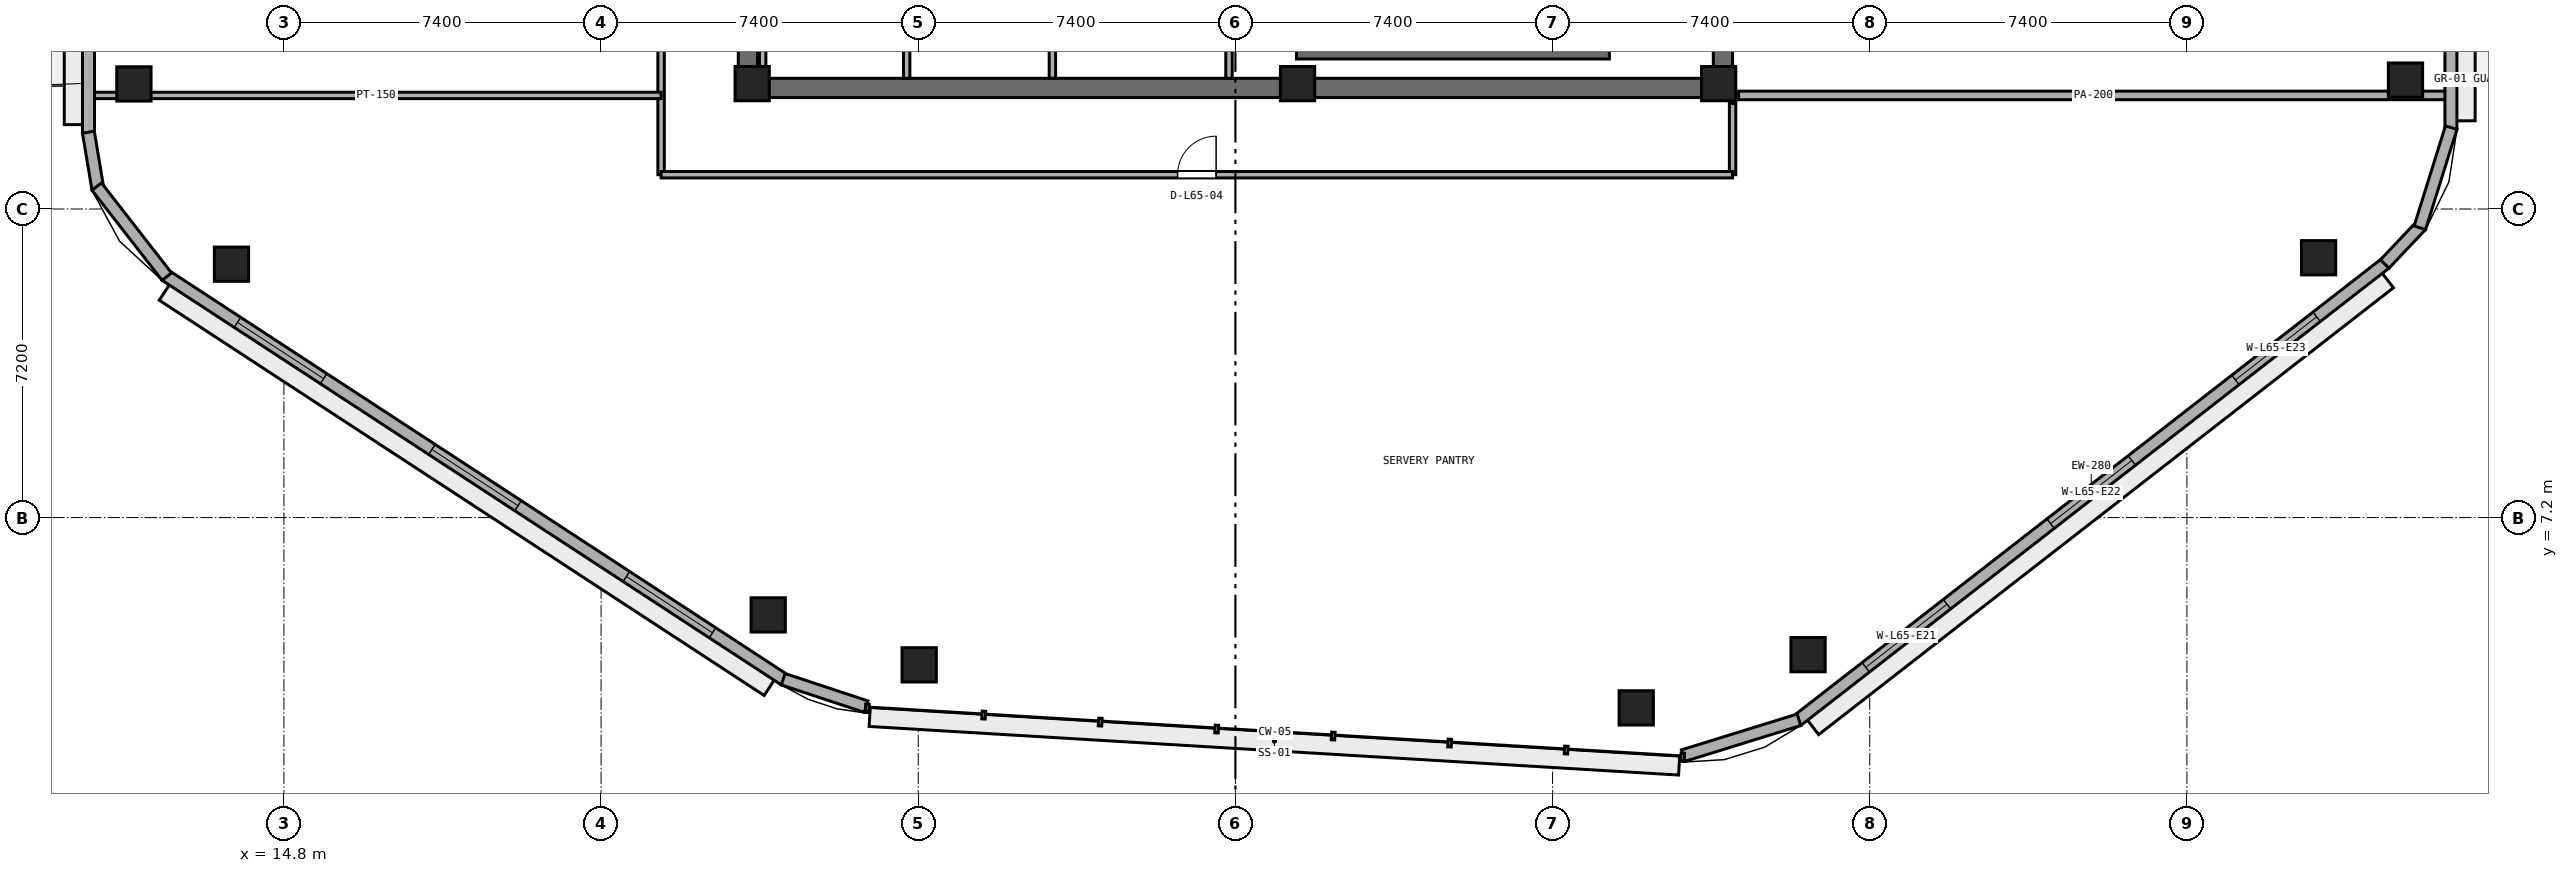
"""IFC4 building model, lengths in metres.
Left out: names, types, materials, properties, quantities, classifications, styles, units other than length and angle.
Written with IfcOpenShell. Run it as: python <this file> out.ifc"""

import sys

from ifc_helpers import new_model, si_unit, direction, frame, frame_2d, origin, origin_2d, place, context, subcontext, project, spatial, rectangle, extrude, element, fill, save


model = new_model("IFC4")
c1 = context("Model", 3, precision=1e-05, world=origin(), true_north=direction((0.0, 1.0)))
c2 = subcontext(c1, "Body", "Model", "MODEL_VIEW")
j1 = project(units=[si_unit("LENGTHUNIT", "METRE"), si_unit("PLANEANGLEUNIT", "RADIAN")], contexts=[c1])
p1 = place(None, origin())
s1 = spatial("IfcSite", under=j1, at=p1, CompositionType="ELEMENT")
p2 = place(p1, origin())
s2 = spatial("IfcBuilding", under=s1, at=p2, CompositionType="ELEMENT")
p3 = place(p2, frame((0.0, 0.0, 255.4)))
s3 = spatial("IfcBuildingStorey", under=s2, at=p3, CompositionType="ELEMENT", Elevation=255.4)
p4 = place(p3, frame((25.4, 17.225, 0.0), z_axis=(0.0, 0.0, 1.0), x_axis=(1.0, 0.0, 0.0)))
e1 = element("IfcWall", 1, at=p4, inside=s3, PredefinedType="SHEAR", context=c2, shape_type="SweptSolid", body=[
    extrude(rectangle(XDim=23.2, YDim=0.45, at=frame_2d((11.6, 0.0))), origin(), (0.0, 0.0, 1.0), 3.51),
])
p5 = place(p3, frame((25.625, 17.45, 0.0), z_axis=(0.0, 0.0, 1.0), x_axis=(0.0, 1.0, 0.0)))
e2 = element("IfcWall", 2, at=p5, inside=s3, PredefinedType="SHEAR", context=c2, shape_type="SweptSolid", body=[
    extrude(rectangle(XDim=15.5, YDim=0.45, at=frame_2d((7.75, 0.0))), origin(), (0.0, 0.0, 1.0), 3.51),
])
p6 = place(p5, frame((7.0, 0.0, 0.0)))
e3 = element("IfcOpeningElement", 3, at=p6, cuts=e2, PredefinedType="OPENING", context=c2, shape_type="SweptSolid", body=[
    extrude(rectangle(XDim=1.5, YDim=2.15, at=frame_2d((0.75, 1.075))), frame((0.0, 0.235, 0.0), z_axis=(0.0, -1.0, 0.0), x_axis=(1.0, 0.0, 0.0)), (0.0, 0.0, 1.0), 0.47),
])
p7 = place(p3, frame((48.375, 17.45, 0.0), z_axis=(0.0, 0.0, 1.0), x_axis=(0.0, 1.0, 0.0)))
e4 = element("IfcWall", 4, at=p7, inside=s3, PredefinedType="SHEAR", context=c2, shape_type="SweptSolid", body=[
    extrude(rectangle(XDim=15.5, YDim=0.45, at=frame_2d((7.75, 0.0))), origin(), (0.0, 0.0, 1.0), 3.51),
])
p8 = place(p7, frame((5.85, 0.0, 0.0)))
e5 = element("IfcOpeningElement", 5, at=p8, cuts=e4, PredefinedType="OPENING", context=c2, shape_type="SweptSolid", body=[
    extrude(rectangle(XDim=1.5, YDim=2.15, at=frame_2d((0.75, 1.075))), frame((0.0, 0.235, 0.0), z_axis=(0.0, -1.0, 0.0), x_axis=(1.0, 0.0, 0.0)), (0.0, 0.0, 1.0), 0.47),
])
for number, where, z_axis, x_axis in (
    (6, (25.725, 17.325, 0.0), (0.0, 0.0, 1.0), (1.0, 0.0, 0.0)),
    (7, (38.45, 17.325, 0.0), (0.0, 0.0, 1.0), (1.0, 0.0, 0.0)),
    (8, (48.275, 17.325, 0.0), (0.0, 0.0, 1.0), (1.0, 0.0, 0.0)),
):
    element("IfcColumn", number, at=place(p3, frame(where, z_axis=z_axis, x_axis=x_axis)), inside=s3, PredefinedType="PILASTER", context=c2, shape_type="SweptSolid", body=[
        extrude(rectangle(XDim=0.8, YDim=0.8, at=origin_2d()), origin(), (0.0, 0.0, 1.0), 3.8),
    ])
for number, where, z_axis, x_axis in (
    (9, (29.622, 3.764, 0.0), (0.0, 0.0, 1.0), (1.0, 0.0, 0.0)),
    (10, (46.352, 2.76, 0.0), (0.0, 0.0, 1.0), (1.0, 0.0, 0.0)),
    (11, (50.361, 4.002, 0.0), (0.0, 0.0, 1.0), (1.0, 0.0, 0.0)),
    (12, (62.272, 13.262, 0.0), (0.0, 0.0, 1.0), (1.0, 0.0, 0.0)),
    (13, (64.3, 17.408, 0.0), (0.0, 0.0, 1.0), (1.0, 0.0, 0.0)),
    (14, (11.3, 17.319, 0.0), (0.0, 0.0, 1.0), (1.0, 0.0, 0.0)),
    (15, (13.576, 13.112, 0.0), (0.0, 0.0, 1.0), (1.0, 0.0, 0.0)),
    (16, (26.099, 4.929, 0.0), (0.0, 0.0, 1.0), (1.0, 0.0, 0.0)),
):
    element("IfcColumn", number, at=place(p3, frame(where, z_axis=z_axis, x_axis=x_axis)), inside=s3, PredefinedType="COLUMN", context=c2, shape_type="SweptSolid", body=[
        extrude(rectangle(XDim=0.8, YDim=0.8, at=origin_2d()), origin(), (0.0, 0.0, 1.0), 3.8),
    ])
p9 = place(p3, frame((38.425, 18.025, 0.0), z_axis=(0.0, 0.0, 1.0), x_axis=(1.0, 0.0, 0.0)))
e17 = element("IfcWall", 17, at=p9, inside=s3, PredefinedType="SHEAR", context=c2, shape_type="SweptSolid", body=[
    extrude(rectangle(XDim=7.3, YDim=0.25, at=frame_2d((3.65, 0.0))), origin(), (0.0, 0.0, 1.0), 3.51),
])
p10 = place(p3, frame((25.97, 17.45, 0.0), z_axis=(0.0, 0.0, 1.0), x_axis=(0.0, 1.0, 0.0)))
e18 = element("IfcWall", 18, at=p10, inside=s3, PredefinedType="PARTITIONING", context=c2, shape_type="SweptSolid", body=[
    extrude(rectangle(XDim=2.3, YDim=0.15, at=frame_2d((1.15, 0.0))), origin(), (0.0, 0.0, 1.0), 2.61),
])
for number, where, z_axis, x_axis in (
    (19, (29.33, 17.45, 0.0), (0.0, 0.0, 1.0), (0.0, 1.0, 0.0)),
    (20, (32.73, 17.45, 0.0), (0.0, 0.0, 1.0), (0.0, 1.0, 0.0)),
    (21, (36.85, 17.45, 0.0), (0.0, 0.0, 1.0), (0.0, 1.0, 0.0)),
):
    element("IfcWall", number, at=place(p3, frame(where, z_axis=z_axis, x_axis=x_axis)), inside=s3, PredefinedType="PARTITIONING", context=c2, shape_type="SweptSolid", body=[
        extrude(rectangle(XDim=2.3, YDim=0.15, at=frame_2d((1.15, 0.0))), origin(), (0.0, 0.0, 1.0), 3.51),
    ])
p11 = place(p3, frame((48.6, 15.2, 0.0), z_axis=(0.0, 0.0, 1.0), x_axis=(0.0, 1.0, 0.0)))
e22 = element("IfcWall", 22, at=p11, inside=s3, PredefinedType="PARTITIONING", context=c2, shape_type="SweptSolid", body=[
    extrude(rectangle(XDim=1.66, YDim=0.15, at=frame_2d((0.83, 0.0))), origin(), (0.0, 0.0, 1.0), 2.893),
])
p12 = place(p3, frame((23.6, 15.2, 0.0), z_axis=(0.0, 0.0, 1.0), x_axis=(0.0, 1.0, 0.0)))
e23 = element("IfcWall", 23, at=p12, inside=s3, PredefinedType="PARTITIONING", context=c2, shape_type="SweptSolid", body=[
    extrude(rectangle(XDim=20.0, YDim=0.15, at=frame_2d((10.0, 0.0))), origin(), (0.0, 0.0, 1.0), 3.51),
])
p13 = place(p12, frame((9.55, 0.0, 0.0)))
e24 = element("IfcOpeningElement", 24, at=p13, cuts=e23, PredefinedType="OPENING", context=c2, shape_type="SweptSolid", body=[
    extrude(rectangle(XDim=0.9, YDim=2.1, at=frame_2d((0.45, 1.05))), frame((0.0, 0.085, 0.0), z_axis=(0.0, -1.0, 0.0), x_axis=(1.0, 0.0, 0.0)), (0.0, 0.0, 1.0), 0.17),
])
p14 = place(p3, frame((23.6, 15.2, 0.0), z_axis=(0.0, 0.0, 1.0), x_axis=(1.0, 0.0, 0.0)))
e25 = element("IfcWall", 25, at=p14, inside=s3, PredefinedType="PARTITIONING", context=c2, shape_type="SweptSolid", body=[
    extrude(rectangle(XDim=25.0, YDim=0.15, at=frame_2d((12.5, 0.0))), origin(), (0.0, 0.0, 1.0), 3.51),
])
p15 = place(p14, frame((12.05, 0.0, 0.0)))
e26 = element("IfcOpeningElement", 26, at=p15, cuts=e25, PredefinedType="OPENING", context=c2, shape_type="SweptSolid", body=[
    extrude(rectangle(XDim=0.9, YDim=2.1, at=frame_2d((0.45, 1.05))), frame((0.0, 0.085, 0.0), z_axis=(0.0, -1.0, 0.0), x_axis=(1.0, 0.0, 0.0)), (0.0, 0.0, 1.0), 0.17),
])
p16 = place(p3, frame((10.305, 17.05, 0.0), z_axis=(0.0, 0.0, 1.0), x_axis=(1.0, 0.0, 0.0)))
e27 = element("IfcWall", 27, at=p16, inside=s3, PredefinedType="PARTITIONING", context=c2, shape_type="SweptSolid", body=[
    extrude(rectangle(XDim=13.295, YDim=0.15, at=frame_2d((6.647, 0.0))), origin(), (0.0, 0.0, 1.0), 3.51),
])
p17 = place(p3, frame((48.74, 17.05, 0.0), z_axis=(0.0, 0.0, 1.0), x_axis=(1.0, 0.0, 0.0)))
e28 = element("IfcWall", 28, at=p17, inside=s3, PredefinedType="PARTITIONING", context=c2, shape_type="SweptSolid", body=[
    extrude(rectangle(XDim=16.555, YDim=0.2, at=frame_2d((8.277, 0.0))), origin(), (0.0, 0.0, 1.0), 2.893),
])
p18 = place(p3, frame((50.104, 2.459, 0.0), z_axis=(0.0, 0.0, 1.0), x_axis=(0.789464857485, 0.613795763097, 0.0)))
e29 = element("IfcWall", 29, at=p18, inside=s3, PredefinedType="STANDARD", context=c2, shape_type="SweptSolid", body=[
    extrude(rectangle(XDim=17.387, YDim=0.28, at=frame_2d((8.694, 0.0))), origin(), (0.0, 0.0, 1.0), 3.51),
])
p19 = place(p18, frame((2.031, 0.0, 0.9)))
e30 = element("IfcOpeningElement", 30, at=p19, cuts=e29, PredefinedType="OPENING", context=c2, shape_type="SweptSolid", body=[
    extrude(rectangle(XDim=2.4, YDim=1.75, at=frame_2d((1.2, 0.875))), frame((0.0, 0.15, 0.0), z_axis=(0.0, -1.0, 0.0), x_axis=(1.0, 0.0, 0.0)), (0.0, 0.0, 1.0), 0.3),
])
p20 = place(p18, frame((7.494, 0.0, 0.9)))
e31 = element("IfcOpeningElement", 31, at=p20, cuts=e29, PredefinedType="OPENING", context=c2, shape_type="SweptSolid", body=[
    extrude(rectangle(XDim=2.4, YDim=1.75, at=frame_2d((1.2, 0.875))), frame((0.0, 0.15, 0.0), z_axis=(0.0, -1.0, 0.0), x_axis=(1.0, 0.0, 0.0)), (0.0, 0.0, 1.0), 0.3),
])
p21 = place(p18, frame((12.956, 0.0, 0.9)))
e32 = element("IfcOpeningElement", 32, at=p21, cuts=e29, PredefinedType="OPENING", context=c2, shape_type="SweptSolid", body=[
    extrude(rectangle(XDim=2.4, YDim=1.75, at=frame_2d((1.2, 0.875))), frame((0.0, 0.15, 0.0), z_axis=(0.0, -1.0, 0.0), x_axis=(1.0, 0.0, 0.0)), (0.0, 0.0, 1.0), 0.3),
])
p22 = place(p3, frame((65.36, 16.258, 0.0), z_axis=(0.0, 0.0, 1.0), x_axis=(0.0, 1.0, 0.0)))
e33 = element("IfcWall", 33, at=p22, inside=s3, PredefinedType="STANDARD", context=c2, shape_type="SweptSolid", body=[
    extrude(rectangle(XDim=19.168, YDim=0.28, at=frame_2d((9.584, 0.0))), origin(), (0.0, 0.0, 1.0), 3.51),
])
p23 = place(p22, frame((9.034, 0.0, 0.0)))
e34 = element("IfcOpeningElement", 34, at=p23, cuts=e33, PredefinedType="OPENING", context=c2, shape_type="SweptSolid", body=[
    extrude(rectangle(XDim=1.1, YDim=2.2, at=frame_2d((0.55, 1.1))), frame((0.0, 0.15, 0.0), z_axis=(0.0, -1.0, 0.0), x_axis=(1.0, 0.0, 0.0)), (0.0, 0.0, 1.0), 0.3),
])
p24 = place(p22, frame((2.328, 0.0, 0.9)))
e35 = element("IfcOpeningElement", 35, at=p24, cuts=e33, PredefinedType="OPENING", context=c2, shape_type="SweptSolid", body=[
    extrude(rectangle(XDim=2.4, YDim=1.75, at=frame_2d((1.2, 0.875))), frame((0.0, 0.15, 0.0), z_axis=(0.0, -1.0, 0.0), x_axis=(1.0, 0.0, 0.0)), (0.0, 0.0, 1.0), 0.3),
])
p25 = place(p22, frame((14.19, 0.0, 0.9)))
e36 = element("IfcOpeningElement", 36, at=p25, cuts=e33, PredefinedType="OPENING", context=c2, shape_type="SweptSolid", body=[
    extrude(rectangle(XDim=2.4, YDim=1.75, at=frame_2d((1.2, 0.875))), frame((0.0, 0.15, 0.0), z_axis=(0.0, -1.0, 0.0), x_axis=(1.0, 0.0, 0.0)), (0.0, 0.0, 1.0), 0.3),
])
p26 = place(p3, frame((10.24, 33.425, 0.0), z_axis=(0.0, 0.0, 1.0), x_axis=(0.0, -1.0, 0.0)))
e37 = element("IfcWall", 37, at=p26, inside=s3, PredefinedType="STANDARD", context=c2, shape_type="SweptSolid", body=[
    extrude(rectangle(XDim=17.257, YDim=0.28, at=frame_2d((8.628, 0.0))), origin(), (0.0, 0.0, 1.0), 3.51),
])
p27 = place(p26, frame((8.078, 0.0, 0.0)))
e38 = element("IfcOpeningElement", 38, at=p27, cuts=e37, PredefinedType="OPENING", context=c2, shape_type="SweptSolid", body=[
    extrude(rectangle(XDim=1.1, YDim=2.2, at=frame_2d((0.55, 1.1))), frame((0.0, 0.15, 0.0), z_axis=(0.0, -1.0, 0.0), x_axis=(1.0, 0.0, 0.0)), (0.0, 0.0, 1.0), 0.3),
])
p28 = place(p26, frame((2.01, 0.0, 0.9)))
e39 = element("IfcOpeningElement", 39, at=p28, cuts=e37, PredefinedType="OPENING", context=c2, shape_type="SweptSolid", body=[
    extrude(rectangle(XDim=2.4, YDim=1.75, at=frame_2d((1.2, 0.875))), frame((0.0, 0.15, 0.0), z_axis=(0.0, -1.0, 0.0), x_axis=(1.0, 0.0, 0.0)), (0.0, 0.0, 1.0), 0.3),
])
p29 = place(p26, frame((12.847, 0.0, 0.9)))
e40 = element("IfcOpeningElement", 40, at=p29, cuts=e37, PredefinedType="OPENING", context=c2, shape_type="SweptSolid", body=[
    extrude(rectangle(XDim=2.4, YDim=1.75, at=frame_2d((1.2, 0.875))), frame((0.0, 0.15, 0.0), z_axis=(0.0, -1.0, 0.0), x_axis=(1.0, 0.0, 0.0)), (0.0, 0.0, 1.0), 0.3),
])
p30 = place(p3, frame((12.034, 12.854, 0.0), z_axis=(0.0, 0.0, 1.0), x_axis=(0.837118352984, -0.547021812269, 0.0)))
e41 = element("IfcWall", 41, at=p30, inside=s3, PredefinedType="STANDARD", context=c2, shape_type="SweptSolid", body=[
    extrude(rectangle(XDim=17.259, YDim=0.28, at=frame_2d((8.63, 0.0))), origin(), (0.0, 0.0, 1.0), 3.51),
])
p31 = place(p30, frame((2.01, 0.0, 0.9)))
e42 = element("IfcOpeningElement", 42, at=p31, cuts=e41, PredefinedType="OPENING", context=c2, shape_type="SweptSolid", body=[
    extrude(rectangle(XDim=2.4, YDim=1.75, at=frame_2d((1.2, 0.875))), frame((0.0, 0.15, 0.0), z_axis=(0.0, -1.0, 0.0), x_axis=(1.0, 0.0, 0.0)), (0.0, 0.0, 1.0), 0.3),
])
p32 = place(p30, frame((7.43, 0.0, 0.9)))
e43 = element("IfcOpeningElement", 43, at=p32, cuts=e41, PredefinedType="OPENING", context=c2, shape_type="SweptSolid", body=[
    extrude(rectangle(XDim=2.4, YDim=1.75, at=frame_2d((1.2, 0.875))), frame((0.0, 0.15, 0.0), z_axis=(0.0, -1.0, 0.0), x_axis=(1.0, 0.0, 0.0)), (0.0, 0.0, 1.0), 0.3),
])
p33 = place(p30, frame((12.849, 0.0, 0.9)))
e44 = element("IfcOpeningElement", 44, at=p33, cuts=e41, PredefinedType="OPENING", context=c2, shape_type="SweptSolid", body=[
    extrude(rectangle(XDim=2.4, YDim=1.75, at=frame_2d((1.2, 0.875))), frame((0.0, 0.15, 0.0), z_axis=(0.0, -1.0, 0.0), x_axis=(1.0, 0.0, 0.0)), (0.0, 0.0, 1.0), 0.3),
])
p34 = place(p3, frame((47.448, 1.646, 0.0), z_axis=(0.0, 0.0, 1.0), x_axis=(0.955196399159, 0.295972699812, 0.0)))
e45 = element("IfcWall", 45, at=p34, inside=s3, PredefinedType="STANDARD", context=c2, shape_type="SweptSolid", body=[
    extrude(rectangle(XDim=2.827, YDim=0.28, at=frame_2d((1.414, 0.0))), origin(), (0.0, 0.0, 1.0), 3.51),
])
p35 = place(p3, frame((63.815, 13.117, 0.0), z_axis=(0.0, 0.0, 1.0), x_axis=(0.687733716128, 0.725963040176, 0.0)))
e46 = element("IfcWall", 46, at=p35, inside=s3, PredefinedType="STANDARD", context=c2, shape_type="SweptSolid", body=[
    extrude(rectangle(XDim=1.239, YDim=0.28, at=frame_2d((0.62, 0.0))), origin(), (0.0, 0.0, 1.0), 3.51),
])
p36 = place(p3, frame((64.635, 13.962, 0.0), z_axis=(0.0, 0.0, 1.0), x_axis=(0.298649578722, 0.954362839348, 0.0)))
e47 = element("IfcWall", 47, at=p36, inside=s3, PredefinedType="STANDARD", context=c2, shape_type="SweptSolid", body=[
    extrude(rectangle(XDim=2.449, YDim=0.28, at=frame_2d((1.225, 0.0))), origin(), (0.0, 0.0, 1.0), 3.51),
])
p37 = place(p3, frame((10.238, 16.192, 0.0), z_axis=(0.0, 0.0, 1.0), x_axis=(0.164604311367, -0.986359681191, 0.0)))
e48 = element("IfcWall", 48, at=p37, inside=s3, PredefinedType="STANDARD", context=c2, shape_type="SweptSolid", body=[
    extrude(rectangle(XDim=1.35, YDim=0.28, at=frame_2d((0.675, 0.0))), origin(), (0.0, 0.0, 1.0), 3.51),
])
p38 = place(p3, frame((10.433, 14.923, 0.0), z_axis=(0.0, 0.0, 1.0), x_axis=(0.614181852676, -0.78916452774, 0.0)))
e49 = element("IfcWall", 49, at=p38, inside=s3, PredefinedType="STANDARD", context=c2, shape_type="SweptSolid", body=[
    extrude(rectangle(XDim=2.662, YDim=0.28, at=frame_2d((1.331, 0.0))), origin(), (0.0, 0.0, 1.0), 3.51),
])
p39 = place(p3, frame((26.449, 3.428, 0.0), z_axis=(0.0, 0.0, 1.0), x_axis=(0.949447063244, -0.313927179609, 0.0)))
e50 = element("IfcWall", 50, at=p39, inside=s3, PredefinedType="STANDARD", context=c2, shape_type="SweptSolid", body=[
    extrude(rectangle(XDim=2.038, YDim=0.28, at=frame_2d((1.019, 0.0))), origin(), (0.0, 0.0, 1.0), 3.51),
])
p40 = place(p15, origin())
e51 = element("IfcDoor", 51, at=p40, inside=s3, OperationType="SINGLE_SWING_RIGHT", PredefinedType="DOOR", context=c2, shape_type="SweptSolid", body=[
    extrude(rectangle(XDim=0.9, YDim=2.1, at=frame_2d((0.45, 1.05))), frame((0.0, 0.025, 0.0), z_axis=(0.0, -1.0, 0.0), x_axis=(1.0, 0.0, 0.0)), (0.0, 0.0, 1.0), 0.05),
])
fill(e26, e51)
p41 = place(p19, origin())
e52 = element("IfcWindow", 52, at=p41, inside=s3, PartitioningType="SINGLE_PANEL", PredefinedType="WINDOW", context=c2, shape_type="SweptSolid", body=[
    extrude(rectangle(XDim=2.4, YDim=1.75, at=frame_2d((1.2, 0.875))), frame((0.0, 0.03, 0.0), z_axis=(0.0, -1.0, 0.0), x_axis=(1.0, 0.0, 0.0)), (0.0, 0.0, 1.0), 0.06),
])
fill(e30, e52)
p42 = place(p20, origin())
e53 = element("IfcWindow", 53, at=p42, inside=s3, PartitioningType="SINGLE_PANEL", PredefinedType="WINDOW", context=c2, shape_type="SweptSolid", body=[
    extrude(rectangle(XDim=2.4, YDim=1.75, at=frame_2d((1.2, 0.875))), frame((0.0, 0.03, 0.0), z_axis=(0.0, -1.0, 0.0), x_axis=(1.0, 0.0, 0.0)), (0.0, 0.0, 1.0), 0.06),
])
fill(e31, e53)
p43 = place(p21, origin())
e54 = element("IfcWindow", 54, at=p43, inside=s3, PartitioningType="SINGLE_PANEL", PredefinedType="WINDOW", context=c2, shape_type="SweptSolid", body=[
    extrude(rectangle(XDim=2.4, YDim=1.75, at=frame_2d((1.2, 0.875))), frame((0.0, 0.03, 0.0), z_axis=(0.0, -1.0, 0.0), x_axis=(1.0, 0.0, 0.0)), (0.0, 0.0, 1.0), 0.06),
])
fill(e32, e54)
p44 = place(p31, origin())
e55 = element("IfcWindow", 55, at=p44, inside=s3, PartitioningType="SINGLE_PANEL", PredefinedType="WINDOW", context=c2, shape_type="SweptSolid", body=[
    extrude(rectangle(XDim=2.4, YDim=1.75, at=frame_2d((1.2, 0.875))), frame((0.0, 0.03, 0.0), z_axis=(0.0, -1.0, 0.0), x_axis=(1.0, 0.0, 0.0)), (0.0, 0.0, 1.0), 0.06),
])
fill(e42, e55)
p45 = place(p32, origin())
e56 = element("IfcWindow", 56, at=p45, inside=s3, PartitioningType="SINGLE_PANEL", PredefinedType="WINDOW", context=c2, shape_type="SweptSolid", body=[
    extrude(rectangle(XDim=2.4, YDim=1.75, at=frame_2d((1.2, 0.875))), frame((0.0, 0.03, 0.0), z_axis=(0.0, -1.0, 0.0), x_axis=(1.0, 0.0, 0.0)), (0.0, 0.0, 1.0), 0.06),
])
fill(e43, e56)
p46 = place(p33, origin())
e57 = element("IfcWindow", 57, at=p46, inside=s3, PartitioningType="SINGLE_PANEL", PredefinedType="WINDOW", context=c2, shape_type="SweptSolid", body=[
    extrude(rectangle(XDim=2.4, YDim=1.75, at=frame_2d((1.2, 0.875))), frame((0.0, 0.03, 0.0), z_axis=(0.0, -1.0, 0.0), x_axis=(1.0, 0.0, 0.0)), (0.0, 0.0, 1.0), 0.06),
])
fill(e44, e57)
save(model, sys.argv[1])
